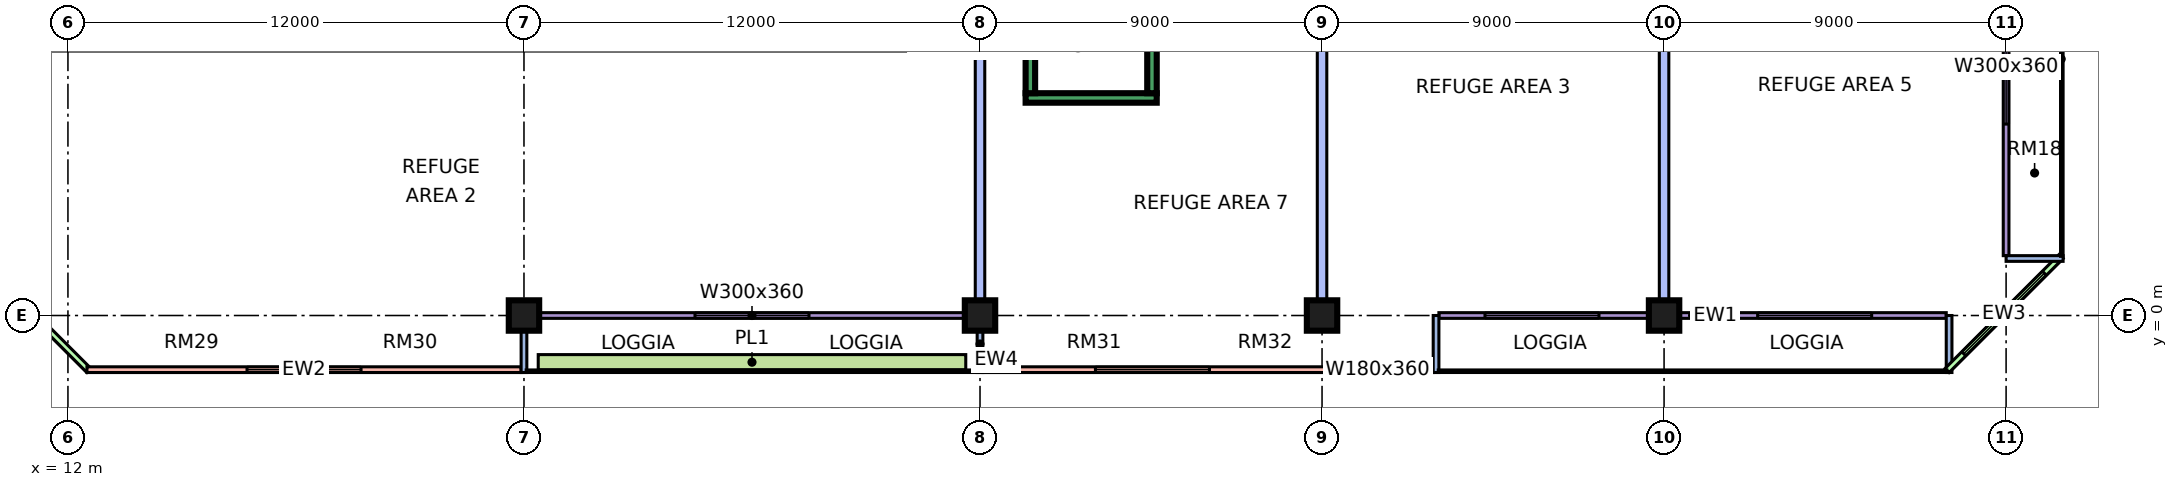
"""IFC4 building model, lengths in metres.
Left out: names, types, materials, properties, quantities, classifications, styles, units other than length and angle.
Written with IfcOpenShell. Run it as: python <this file> out.ifc"""

import sys

from ifc_helpers import new_model, si_unit, direction, frame, frame_2d, origin, origin_2d, place, context, subcontext, project, spatial, rectangle, extrude, element, fill, save


model = new_model("IFC4")
c1 = context("Model", 3, precision=1e-05, world=origin(), true_north=direction((0.0, 1.0)))
c2 = subcontext(c1, "Body", "Model", "MODEL_VIEW")
j1 = project(units=[si_unit("LENGTHUNIT", "METRE"), si_unit("PLANEANGLEUNIT", "RADIAN")], contexts=[c1])
p1 = place(None, origin())
s1 = spatial("IfcSite", under=j1, at=p1, CompositionType="ELEMENT")
p2 = place(p1, origin())
s2 = spatial("IfcBuilding", under=s1, at=p2, CompositionType="ELEMENT")
p3 = place(p2, frame((0.0, 0.0, 322.15)))
s3 = spatial("IfcBuildingStorey", under=s2, at=p3, CompositionType="ELEMENT", Elevation=322.15)
for number, where, z_axis, x_axis in (
    (1, (24.0, 0.0, 0.0), (0.0, 0.0, 1.0), (1.0, 0.0, 0.0)),
    (2, (36.0, 0.0, 0.0), (0.0, 0.0, 1.0), (1.0, 0.0, 0.0)),
    (3, (45.0, 0.0, 0.0), (0.0, 0.0, 1.0), (1.0, 0.0, 0.0)),
    (4, (54.0, 0.0, 0.0), (0.0, 0.0, 1.0), (1.0, 0.0, 0.0)),
):
    element("IfcColumn", number, at=place(p3, frame(where, z_axis=z_axis, x_axis=x_axis)), inside=s3, PredefinedType="COLUMN", context=c2, shape_type="SweptSolid", body=[
        extrude(rectangle(XDim=0.8, YDim=0.8, at=origin_2d()), origin(), (0.0, 0.0, 1.0), 5.5),
    ])
p4 = place(p3, frame((37.2, 5.725, 0.0), z_axis=(0.0, 0.0, 1.0), x_axis=(1.0, 0.0, 0.0)))
e5 = element("IfcWall", 5, at=p4, inside=s3, PredefinedType="SHEAR", context=c2, shape_type="SweptSolid", body=[
    extrude(rectangle(XDim=3.45, YDim=0.25, at=frame_2d((1.725, 0.0))), origin(), (0.0, 0.0, 1.0), 5.5),
])
for number, where, z_axis, x_axis in (
    (6, (37.325, 5.85, 0.0), (0.0, 0.0, 1.0), (0.0, 1.0, 0.0)),
    (7, (40.525, 5.85, 0.0), (0.0, 0.0, 1.0), (0.0, 1.0, 0.0)),
):
    element("IfcWall", number, at=place(p3, frame(where, z_axis=z_axis, x_axis=x_axis)), inside=s3, PredefinedType="SHEAR", context=c2, shape_type="SweptSolid", body=[
        extrude(rectangle(XDim=6.5, YDim=0.25, at=frame_2d((3.25, 0.0))), origin(), (0.0, 0.0, 1.0), 5.5),
    ])
p5 = place(p3, frame((-1.447, 12.553, 0.0), z_axis=(0.0, 0.0, 1.0), x_axis=(0.707106781187, -0.707106781187, 0.0)))
e8 = element("IfcWall", 8, at=p5, inside=s3, PredefinedType="SOLIDWALL", context=c2, shape_type="SweptSolid", body=[
    extrude(rectangle(XDim=19.799, YDim=0.15, at=frame_2d((9.899, 0.0))), origin(), (0.0, 0.0, 1.0), 5.05),
])
p6 = place(p5, frame((11.453, 0.0, 0.45)))
e9 = element("IfcOpeningElement", 9, at=p6, cuts=e8, PredefinedType="OPENING", context=c2, shape_type="SweptSolid", body=[
    extrude(rectangle(XDim=3.0, YDim=3.6, at=frame_2d((1.5, 1.8))), frame((0.0, 0.085, 0.0), z_axis=(0.0, -1.0, 0.0), x_axis=(1.0, 0.0, 0.0)), (0.0, 0.0, 1.0), 0.17),
])
p7 = place(p3, frame((12.5, -1.425, 0.0), z_axis=(0.0, 0.0, 1.0), x_axis=(1.0, 0.0, 0.0)))
e10 = element("IfcWall", 10, at=p7, inside=s3, PredefinedType="SOLIDWALL", context=c2, shape_type="SweptSolid", body=[
    extrude(rectangle(XDim=11.425, YDim=0.15, at=frame_2d((5.712, 0.0))), origin(), (0.0, 0.0, 1.0), 5.05),
])
p8 = place(p7, frame((4.212, 0.0, 0.45)))
e11 = element("IfcOpeningElement", 11, at=p8, cuts=e10, PredefinedType="OPENING", context=c2, shape_type="SweptSolid", body=[
    extrude(rectangle(XDim=3.0, YDim=3.6, at=frame_2d((1.5, 1.8))), frame((0.0, 0.085, 0.0), z_axis=(0.0, -1.0, 0.0), x_axis=(1.0, 0.0, 0.0)), (0.0, 0.0, 1.0), 0.17),
])
p9 = place(p3, frame((24.075, 0.0, 0.0), z_axis=(0.0, 0.0, 1.0), x_axis=(1.0, 0.0, 0.0)))
e12 = element("IfcWall", 12, at=p9, inside=s3, PredefinedType="SOLIDWALL", context=c2, shape_type="SweptSolid", body=[
    extrude(rectangle(XDim=11.85, YDim=0.15, at=frame_2d((5.925, 0.0))), origin(), (0.0, 0.0, 1.0), 5.05),
])
p10 = place(p9, frame((4.425, 0.0, 0.45)))
e13 = element("IfcOpeningElement", 13, at=p10, cuts=e12, PredefinedType="OPENING", context=c2, shape_type="SweptSolid", body=[
    extrude(rectangle(XDim=3.0, YDim=3.6, at=frame_2d((1.5, 1.8))), frame((0.0, 0.085, 0.0), z_axis=(0.0, -1.0, 0.0), x_axis=(1.0, 0.0, 0.0)), (0.0, 0.0, 1.0), 0.17),
])
for number, where, z_axis, x_axis in (
    (14, (24.0, -1.5, 0.0), (0.0, 0.0, 1.0), (0.0, 1.0, 0.0)),
    (15, (36.0, -1.5, 0.0), (0.0, 0.0, 1.0), (0.0, 1.0, 0.0)),
):
    element("IfcWall", number, at=place(p3, frame(where, z_axis=z_axis, x_axis=x_axis)), inside=s3, PredefinedType="SOLIDWALL", context=c2, shape_type="SweptSolid", body=[
        extrude(rectangle(XDim=1.5, YDim=0.15, at=frame_2d((0.75, 0.0))), origin(), (0.0, 0.0, 1.0), 5.05),
    ])
p11 = place(p3, frame((36.075, -1.425, 0.0), z_axis=(0.0, 0.0, 1.0), x_axis=(1.0, 0.0, 0.0)))
e16 = element("IfcWall", 16, at=p11, inside=s3, PredefinedType="SOLIDWALL", context=c2, shape_type="SweptSolid", body=[
    extrude(rectangle(XDim=11.85, YDim=0.15, at=frame_2d((5.925, 0.0))), origin(), (0.0, 0.0, 1.0), 5.05),
])
p12 = place(p11, frame((2.962, 0.0, 0.45)))
e17 = element("IfcOpeningElement", 17, at=p12, cuts=e16, PredefinedType="OPENING", context=c2, shape_type="SweptSolid", body=[
    extrude(rectangle(XDim=3.0, YDim=3.6, at=frame_2d((1.5, 1.8))), frame((0.0, 0.085, 0.0), z_axis=(0.0, -1.0, 0.0), x_axis=(1.0, 0.0, 0.0)), (0.0, 0.0, 1.0), 0.17),
])
p13 = place(p11, frame((9.488, 0.0, 0.45)))
e18 = element("IfcOpeningElement", 18, at=p13, cuts=e16, PredefinedType="OPENING", context=c2, shape_type="SweptSolid", body=[
    extrude(rectangle(XDim=1.8, YDim=3.6, at=frame_2d((0.9, 1.8))), frame((0.0, 0.085, 0.0), z_axis=(0.0, -1.0, 0.0), x_axis=(1.0, 0.0, 0.0)), (0.0, 0.0, 1.0), 0.17),
])
p14 = place(p3, frame((48.075, 0.0, 0.0), z_axis=(0.0, 0.0, 1.0), x_axis=(1.0, 0.0, 0.0)))
e19 = element("IfcWall", 19, at=p14, inside=s3, PredefinedType="SOLIDWALL", context=c2, shape_type="SweptSolid", body=[
    extrude(rectangle(XDim=13.35, YDim=0.15, at=frame_2d((6.675, 0.0))), origin(), (0.0, 0.0, 1.0), 5.05),
])
p15 = place(p14, frame((1.212, 0.0, 0.45)))
e20 = element("IfcOpeningElement", 20, at=p15, cuts=e19, PredefinedType="OPENING", context=c2, shape_type="SweptSolid", body=[
    extrude(rectangle(XDim=3.0, YDim=3.6, at=frame_2d((1.5, 1.8))), frame((0.0, 0.085, 0.0), z_axis=(0.0, -1.0, 0.0), x_axis=(1.0, 0.0, 0.0)), (0.0, 0.0, 1.0), 0.17),
])
p16 = place(p14, frame((8.387, 0.0, 0.45)))
e21 = element("IfcOpeningElement", 21, at=p16, cuts=e19, PredefinedType="OPENING", context=c2, shape_type="SweptSolid", body=[
    extrude(rectangle(XDim=3.0, YDim=3.6, at=frame_2d((1.5, 1.8))), frame((0.0, 0.085, 0.0), z_axis=(0.0, -1.0, 0.0), x_axis=(1.0, 0.0, 0.0)), (0.0, 0.0, 1.0), 0.17),
])
for number, where, z_axis, x_axis in (
    (22, (48.0, -1.5, 0.0), (0.0, 0.0, 1.0), (0.0, 1.0, 0.0)),
    (23, (61.5, -1.5, 0.0), (0.0, 0.0, 1.0), (0.0, 1.0, 0.0)),
):
    element("IfcWall", number, at=place(p3, frame(where, z_axis=z_axis, x_axis=x_axis)), inside=s3, PredefinedType="SOLIDWALL", context=c2, shape_type="SweptSolid", body=[
        extrude(rectangle(XDim=1.5, YDim=0.15, at=frame_2d((0.75, 0.0))), origin(), (0.0, 0.0, 1.0), 5.05),
    ])
p17 = place(p3, frame((61.447, -1.447, 0.0), z_axis=(0.0, 0.0, 1.0), x_axis=(0.707106781187, 0.707106781187, 0.0)))
e24 = element("IfcWall", 24, at=p17, inside=s3, PredefinedType="SOLIDWALL", context=c2, shape_type="SweptSolid", body=[
    extrude(rectangle(XDim=4.243, YDim=0.15, at=frame_2d((2.121, 0.0))), origin(), (0.0, 0.0, 1.0), 5.05),
])
p18 = place(p17, frame((0.621, 0.0, 0.45)))
e25 = element("IfcOpeningElement", 25, at=p18, cuts=e24, PredefinedType="OPENING", context=c2, shape_type="SweptSolid", body=[
    extrude(rectangle(XDim=3.0, YDim=3.6, at=frame_2d((1.5, 1.8))), frame((0.0, 0.085, 0.0), z_axis=(0.0, -1.0, 0.0), x_axis=(1.0, 0.0, 0.0)), (0.0, 0.0, 1.0), 0.17),
])
p19 = place(p3, frame((63.0, 1.575, 0.0), z_axis=(0.0, 0.0, 1.0), x_axis=(0.0, 1.0, 0.0)))
e26 = element("IfcWall", 26, at=p19, inside=s3, PredefinedType="SOLIDWALL", context=c2, shape_type="SweptSolid", body=[
    extrude(rectangle(XDim=10.35, YDim=0.15, at=frame_2d((5.175, 0.0))), origin(), (0.0, 0.0, 1.0), 5.05),
])
p20 = place(p19, frame((3.462, 0.0, 0.45)))
e27 = element("IfcOpeningElement", 27, at=p20, cuts=e26, PredefinedType="OPENING", context=c2, shape_type="SweptSolid", body=[
    extrude(rectangle(XDim=3.0, YDim=3.6, at=frame_2d((1.5, 1.8))), frame((0.0, 0.085, 0.0), z_axis=(0.0, -1.0, 0.0), x_axis=(1.0, 0.0, 0.0)), (0.0, 0.0, 1.0), 0.17),
])
p21 = place(p3, frame((64.5, 1.5, 0.0), z_axis=(0.0, 0.0, 1.0), x_axis=(-1.0, 0.0, 0.0)))
e28 = element("IfcWall", 28, at=p21, inside=s3, PredefinedType="SOLIDWALL", context=c2, shape_type="SweptSolid", body=[
    extrude(rectangle(XDim=1.5, YDim=0.15, at=frame_2d((0.75, 0.0))), origin(), (0.0, 0.0, 1.0), 5.05),
])
p22 = place(p3, frame((24.375, -1.229, 0.0), z_axis=(0.0, 0.0, 1.0), x_axis=(1.0, 0.0, 0.0)))
e29 = element("IfcWall", 29, at=p22, inside=s3, PredefinedType="SOLIDWALL", context=c2, shape_type="SweptSolid", body=[
    extrude(rectangle(XDim=11.25, YDim=0.4, at=frame_2d((5.625, 0.0))), origin(), (0.0, 0.0, 1.0), 0.7),
])
p23 = place(p3, frame((36.0, 0.0, 0.0), z_axis=(0.0, 0.0, 1.0), x_axis=(0.0, 1.0, 0.0)))
e30 = element("IfcWall", 30, at=p23, inside=s3, PredefinedType="PARTITIONING", context=c2, shape_type="SweptSolid", body=[
    extrude(rectangle(XDim=7.125, YDim=0.25, at=frame_2d((3.562, 0.0))), origin(), (0.0, 0.0, 1.0), 5.05),
])
p24 = place(p3, frame((36.125, 7.0, 0.0), z_axis=(0.0, 0.0, 1.0), x_axis=(1.0, 0.0, 0.0)))
e31 = element("IfcWall", 31, at=p24, inside=s3, PredefinedType="PARTITIONING", context=c2, shape_type="SweptSolid", body=[
    extrude(rectangle(XDim=0.25, YDim=0.25, at=frame_2d((0.125, 0.0))), origin(), (0.0, 0.0, 1.0), 5.05),
])
p25 = place(p3, frame((36.5, 6.875, 0.0), z_axis=(0.0, 0.0, 1.0), x_axis=(0.0, 1.0, 0.0)))
e32 = element("IfcWall", 32, at=p25, inside=s3, PredefinedType="PARTITIONING", context=c2, shape_type="SweptSolid", body=[
    extrude(rectangle(XDim=5.0, YDim=0.25, at=frame_2d((2.5, 0.0))), origin(), (0.0, 0.0, 1.0), 5.05),
])
p26 = place(p3, frame((45.0, 0.0, 0.0), z_axis=(0.0, 0.0, 1.0), x_axis=(0.0, 1.0, 0.0)))
e33 = element("IfcWall", 33, at=p26, inside=s3, PredefinedType="PARTITIONING", context=c2, shape_type="SweptSolid", body=[
    extrude(rectangle(XDim=11.875, YDim=0.25, at=frame_2d((5.938, 0.0))), origin(), (0.0, 0.0, 1.0), 5.05),
])
p27 = place(p3, frame((54.0, 0.074, 0.0), z_axis=(0.0, 0.0, 1.0), x_axis=(0.0, 1.0, 0.0)))
e34 = element("IfcWall", 34, at=p27, inside=s3, PredefinedType="PARTITIONING", context=c2, shape_type="SweptSolid", body=[
    extrude(rectangle(XDim=11.801, YDim=0.25, at=frame_2d((5.9, 0.0))), origin(), (0.0, 0.0, 1.0), 5.05),
])
p28 = place(p8, origin())
e35 = element("IfcWindow", 35, at=p28, inside=s3, PartitioningType="SINGLE_PANEL", PredefinedType="WINDOW", context=c2, shape_type="SweptSolid", body=[
    extrude(rectangle(XDim=3.0, YDim=3.6, at=frame_2d((1.5, 1.8))), frame((0.0, 0.03, 0.0), z_axis=(0.0, -1.0, 0.0), x_axis=(1.0, 0.0, 0.0)), (0.0, 0.0, 1.0), 0.06),
])
fill(e11, e35)
p29 = place(p10, origin())
e36 = element("IfcWindow", 36, at=p29, inside=s3, PartitioningType="SINGLE_PANEL", PredefinedType="WINDOW", context=c2, shape_type="SweptSolid", body=[
    extrude(rectangle(XDim=3.0, YDim=3.6, at=frame_2d((1.5, 1.8))), frame((0.0, 0.03, 0.0), z_axis=(0.0, -1.0, 0.0), x_axis=(1.0, 0.0, 0.0)), (0.0, 0.0, 1.0), 0.06),
])
fill(e13, e36)
p30 = place(p12, origin())
e37 = element("IfcWindow", 37, at=p30, inside=s3, PartitioningType="SINGLE_PANEL", PredefinedType="WINDOW", context=c2, shape_type="SweptSolid", body=[
    extrude(rectangle(XDim=3.0, YDim=3.6, at=frame_2d((1.5, 1.8))), frame((0.0, 0.03, 0.0), z_axis=(0.0, -1.0, 0.0), x_axis=(1.0, 0.0, 0.0)), (0.0, 0.0, 1.0), 0.06),
])
fill(e17, e37)
p31 = place(p13, origin())
e38 = element("IfcWindow", 38, at=p31, inside=s3, PartitioningType="SINGLE_PANEL", PredefinedType="WINDOW", context=c2, shape_type="SweptSolid", body=[
    extrude(rectangle(XDim=1.8, YDim=3.6, at=frame_2d((0.9, 1.8))), frame((0.0, 0.03, 0.0), z_axis=(0.0, -1.0, 0.0), x_axis=(1.0, 0.0, 0.0)), (0.0, 0.0, 1.0), 0.06),
])
fill(e18, e38)
p32 = place(p15, origin())
e39 = element("IfcWindow", 39, at=p32, inside=s3, PartitioningType="SINGLE_PANEL", PredefinedType="WINDOW", context=c2, shape_type="SweptSolid", body=[
    extrude(rectangle(XDim=3.0, YDim=3.6, at=frame_2d((1.5, 1.8))), frame((0.0, 0.03, 0.0), z_axis=(0.0, -1.0, 0.0), x_axis=(1.0, 0.0, 0.0)), (0.0, 0.0, 1.0), 0.06),
])
fill(e20, e39)
p33 = place(p16, origin())
e40 = element("IfcWindow", 40, at=p33, inside=s3, PartitioningType="SINGLE_PANEL", PredefinedType="WINDOW", context=c2, shape_type="SweptSolid", body=[
    extrude(rectangle(XDim=3.0, YDim=3.6, at=frame_2d((1.5, 1.8))), frame((0.0, 0.03, 0.0), z_axis=(0.0, -1.0, 0.0), x_axis=(1.0, 0.0, 0.0)), (0.0, 0.0, 1.0), 0.06),
])
fill(e21, e40)
p34 = place(p18, origin())
e41 = element("IfcWindow", 41, at=p34, inside=s3, PartitioningType="SINGLE_PANEL", PredefinedType="WINDOW", context=c2, shape_type="SweptSolid", body=[
    extrude(rectangle(XDim=3.0, YDim=3.6, at=frame_2d((1.5, 1.8))), frame((0.0, 0.03, 0.0), z_axis=(0.0, -1.0, 0.0), x_axis=(1.0, 0.0, 0.0)), (0.0, 0.0, 1.0), 0.06),
])
fill(e25, e41)
p35 = place(p20, origin())
e42 = element("IfcWindow", 42, at=p35, inside=s3, PartitioningType="SINGLE_PANEL", PredefinedType="WINDOW", context=c2, shape_type="SweptSolid", body=[
    extrude(rectangle(XDim=3.0, YDim=3.6, at=frame_2d((1.5, 1.8))), frame((0.0, 0.03, 0.0), z_axis=(0.0, -1.0, 0.0), x_axis=(1.0, 0.0, 0.0)), (0.0, 0.0, 1.0), 0.06),
])
fill(e27, e42)
save(model, sys.argv[1])
